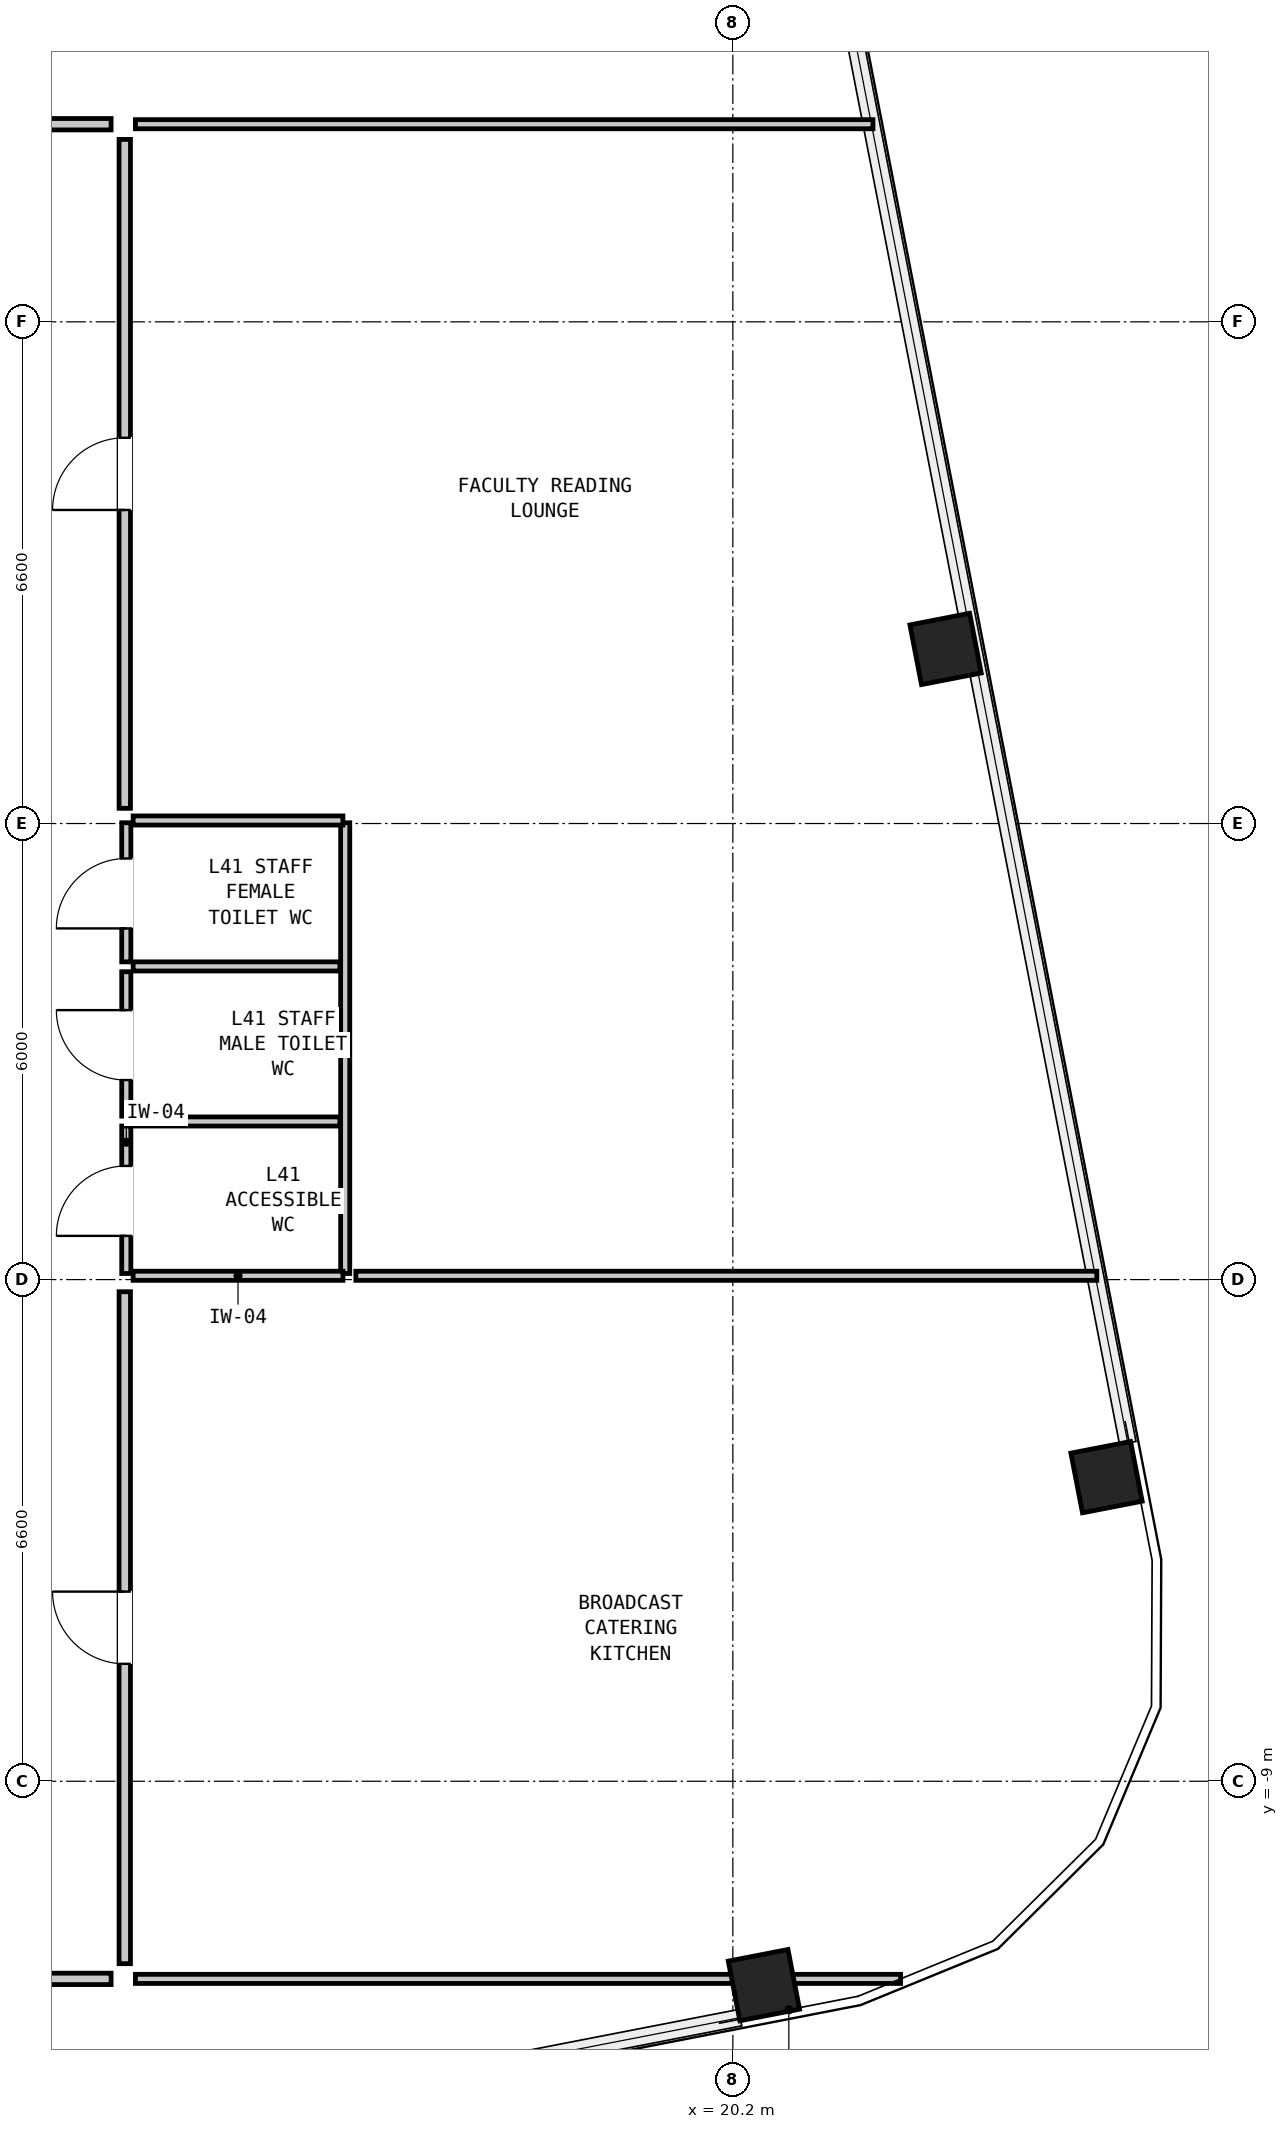
"""IFC4 building model, lengths in metres.
Left out: names, types, materials, properties, quantities, classifications, styles, units other than length and angle.
Written with IfcOpenShell. Run it as: python <this file> out.ifc"""

import sys

from ifc_helpers import new_model, si_unit, direction, frame, frame_2d, origin, origin_2d, place, context, subcontext, project, spatial, rectangle, hollow_rectangle, extrude, element, fill, save


model = new_model("IFC4")
c1 = context("Model", 3, precision=1e-05, world=origin(), true_north=direction((0.0, 1.0)))
c2 = subcontext(c1, "Body", "Model", "MODEL_VIEW")
j1 = project(units=[si_unit("LENGTHUNIT", "METRE"), si_unit("PLANEANGLEUNIT", "RADIAN")], contexts=[c1])
p1 = place(None, origin())
s1 = spatial("IfcSite", under=j1, at=p1, CompositionType="ELEMENT")
p2 = place(p1, origin())
s2 = spatial("IfcBuilding", under=s1, at=p2, CompositionType="ELEMENT")
p3 = place(p2, frame((0.0, 0.0, 140.25)))
s3 = spatial("IfcBuildingStorey", under=s2, at=p3, CompositionType="ELEMENT", Elevation=140.25)
for number, where, z_axis, x_axis in (
    (1, (20.609, -11.682, 0.0), (0.0, 0.0, 1.0), (0.982, 0.191, 0.0)),
    (2, (25.116, -5.0, 0.0), (0.0, 0.0, 1.0), (-0.191, 0.982, 0.0)),
    (3, (22.998, 5.896, 0.0), (0.0, 0.0, 1.0), (-0.191, 0.982, 0.0)),
):
    element("IfcColumn", number, at=place(p3, frame(where, z_axis=z_axis, x_axis=x_axis)), inside=s3, PredefinedType="COLUMN", context=c2, shape_type="SweptSolid", body=[
        extrude(hollow_rectangle(XDim=0.8, YDim=0.8, WallThickness=0.05, at=origin_2d()), origin(), (0.0, 0.0, 1.0), 4.35),
    ])
p4 = place(p3, frame((12.22, -2.32, 0.0), z_axis=(0.0, 0.0, 1.0), x_axis=(0.0, 1.0, 0.0)))
e4 = element("IfcWall", 4, at=p4, inside=s3, PredefinedType="PARTITIONING", context=c2, shape_type="SweptSolid", body=[
    extrude(rectangle(XDim=1.94, YDim=0.12, at=frame_2d((0.97, 0.0))), origin(), (0.0, 0.0, 1.0), 4.07),
])
p5 = place(p4, frame((0.495, 0.0, 0.0)))
e5 = element("IfcOpeningElement", 5, at=p5, cuts=e4, PredefinedType="OPENING", context=c2, shape_type="SweptSolid", body=[
    extrude(rectangle(XDim=0.92, YDim=2.1, at=frame_2d((0.46, 1.05))), frame((0.0, 0.072, 0.0), z_axis=(0.0, -1.0, 0.0), x_axis=(1.0, 0.0, 0.0)), (0.0, 0.0, 1.0), 0.144),
])
p6 = place(p3, frame((12.22, -0.25, 0.0), z_axis=(0.0, 0.0, 1.0), x_axis=(0.0, 1.0, 0.0)))
e6 = element("IfcWall", 6, at=p6, inside=s3, PredefinedType="PARTITIONING", context=c2, shape_type="SweptSolid", body=[
    extrude(rectangle(XDim=1.9, YDim=0.12, at=frame_2d((0.95, 0.0))), origin(), (0.0, 0.0, 1.0), 4.07),
])
p7 = place(p6, frame((0.475, 0.0, 0.0)))
e7 = element("IfcOpeningElement", 7, at=p7, cuts=e6, PredefinedType="OPENING", context=c2, shape_type="SweptSolid", body=[
    extrude(rectangle(XDim=0.92, YDim=2.1, at=frame_2d((0.46, 1.05))), frame((0.0, 0.072, 0.0), z_axis=(0.0, -1.0, 0.0), x_axis=(1.0, 0.0, 0.0)), (0.0, 0.0, 1.0), 0.144),
])
p8 = place(p3, frame((12.22, 1.78, 0.0), z_axis=(0.0, 0.0, 1.0), x_axis=(0.0, 1.0, 0.0)))
e8 = element("IfcWall", 8, at=p8, inside=s3, PredefinedType="PARTITIONING", context=c2, shape_type="SweptSolid", body=[
    extrude(rectangle(XDim=1.83, YDim=0.12, at=frame_2d((0.915, 0.0))), origin(), (0.0, 0.0, 1.0), 4.07),
])
p9 = place(p8, frame((0.44, 0.0, 0.0)))
e9 = element("IfcOpeningElement", 9, at=p9, cuts=e8, PredefinedType="OPENING", context=c2, shape_type="SweptSolid", body=[
    extrude(rectangle(XDim=0.92, YDim=2.1, at=frame_2d((0.46, 1.05))), frame((0.0, 0.072, 0.0), z_axis=(0.0, -1.0, 0.0), x_axis=(1.0, 0.0, 0.0)), (0.0, 0.0, 1.0), 0.144),
])
p10 = place(p3, frame((15.1, -2.32, 0.0), z_axis=(0.0, 0.0, 1.0), x_axis=(0.0, 1.0, 0.0)))
e10 = element("IfcWall", 10, at=p10, inside=s3, PredefinedType="PARTITIONING", context=c2, shape_type="SweptSolid", body=[
    extrude(rectangle(XDim=5.93, YDim=0.12, at=frame_2d((2.965, 0.0))), origin(), (0.0, 0.0, 1.0), 2.25),
])
for number, where, z_axis, x_axis in (
    (11, (12.31, -2.35, 0.0), (0.0, 0.0, 1.0), (1.0, 0.0, 0.0)),
    (12, (12.31, 3.64, 0.0), (0.0, 0.0, 1.0), (1.0, 0.0, 0.0)),
):
    element("IfcWall", number, at=place(p3, frame(where, z_axis=z_axis, x_axis=x_axis)), inside=s3, PredefinedType="PARTITIONING", context=c2, shape_type="SweptSolid", body=[
        extrude(rectangle(XDim=2.76, YDim=0.12, at=frame_2d((1.38, 0.0))), origin(), (0.0, 0.0, 1.0), 2.25),
    ])
p11 = place(p3, frame((12.31, -0.32, 0.0), z_axis=(0.0, 0.0, 1.0), x_axis=(1.0, 0.0, 0.0)))
e13 = element("IfcWall", 13, at=p11, inside=s3, PredefinedType="PARTITIONING", context=c2, shape_type="SweptSolid", body=[
    extrude(rectangle(XDim=2.72, YDim=0.12, at=frame_2d((1.36, 0.0))), origin(), (0.0, 0.0, 1.0), 4.07),
])
p12 = place(p3, frame((12.31, 1.72, 0.0), z_axis=(0.0, 0.0, 1.0), x_axis=(1.0, 0.0, 0.0)))
e14 = element("IfcWall", 14, at=p12, inside=s3, PredefinedType="PARTITIONING", context=c2, shape_type="SweptSolid", body=[
    extrude(rectangle(XDim=2.72, YDim=0.12, at=frame_2d((1.36, 0.0))), origin(), (0.0, 0.0, 1.0), 2.25),
])
p13 = place(p3, frame((12.34, 12.8, 0.0), z_axis=(0.0, 0.0, 1.0), x_axis=(1.0, 0.0, 0.0)))
e15 = element("IfcWall", 15, at=p13, inside=s3, PredefinedType="PARTITIONING", context=c2, shape_type="SweptSolid", body=[
    extrude(rectangle(XDim=9.703, YDim=0.12, at=frame_2d((4.852, 0.0))), origin(), (0.0, 0.0, 1.0), 4.07),
])
p14 = place(p3, frame((12.34, -11.6, 0.0), z_axis=(0.0, 0.0, 1.0), x_axis=(1.0, 0.0, 0.0)))
e16 = element("IfcWall", 16, at=p14, inside=s3, PredefinedType="PARTITIONING", context=c2, shape_type="SweptSolid", body=[
    extrude(rectangle(XDim=10.066, YDim=0.12, at=frame_2d((5.033, 0.0))), origin(), (0.0, 0.0, 1.0), 2.25),
])
p15 = place(p3, frame((15.24, -2.35, 0.0), z_axis=(0.0, 0.0, 1.0), x_axis=(1.0, 0.0, 0.0)))
e17 = element("IfcWall", 17, at=p15, inside=s3, PredefinedType="PARTITIONING", context=c2, shape_type="SweptSolid", body=[
    extrude(rectangle(XDim=9.748, YDim=0.12, at=frame_2d((4.874, 0.0))), origin(), (0.0, 0.0, 1.0), 2.25),
])
p16 = place(p3, frame((5.58, 12.8, 0.0), z_axis=(0.0, 0.0, 1.0), x_axis=(1.0, 0.0, 0.0)))
e18 = element("IfcWall", 18, at=p16, inside=s3, PredefinedType="PARTITIONING", context=c2, shape_type="SweptSolid", body=[
    extrude(rectangle(XDim=6.44, YDim=0.15, at=frame_2d((3.22, 0.0))), origin(), (0.0, 0.0, 1.0), 4.07),
])
p17 = place(p16, frame((2.62, 0.0, 0.0)))
e19 = element("IfcOpeningElement", 19, at=p17, cuts=e18, PredefinedType="OPENING", context=c2, shape_type="SweptSolid", body=[
    extrude(rectangle(XDim=1.2, YDim=2.1, at=frame_2d((0.6, 1.05))), frame((0.0, 0.087, 0.0), z_axis=(0.0, -1.0, 0.0), x_axis=(1.0, 0.0, 0.0)), (0.0, 0.0, 1.0), 0.174),
])
p18 = place(p3, frame((0.18, -11.6, 0.0), z_axis=(0.0, 0.0, 1.0), x_axis=(1.0, 0.0, 0.0)))
e20 = element("IfcWall", 20, at=p18, inside=s3, PredefinedType="PARTITIONING", context=c2, shape_type="SweptSolid", body=[
    extrude(rectangle(XDim=11.84, YDim=0.15, at=frame_2d((5.92, 0.0))), origin(), (0.0, 0.0, 1.0), 2.25),
])
p19 = place(p18, frame((5.32, 0.0, 0.0)))
e21 = element("IfcOpeningElement", 21, at=p19, cuts=e20, PredefinedType="OPENING", context=c2, shape_type="SweptSolid", body=[
    extrude(rectangle(XDim=1.2, YDim=2.1, at=frame_2d((0.6, 1.05))), frame((0.0, 0.087, 0.0), z_axis=(0.0, -1.0, 0.0), x_axis=(1.0, 0.0, 0.0)), (0.0, 0.0, 1.0), 0.174),
])
p20 = place(p3, frame((12.2, -11.4, 0.0), z_axis=(0.0, 0.0, 1.0), x_axis=(0.0, 1.0, 0.0)))
e22 = element("IfcWall", 22, at=p20, inside=s3, PredefinedType="PARTITIONING", context=c2, shape_type="SweptSolid", body=[
    extrude(rectangle(XDim=8.84, YDim=0.15, at=frame_2d((4.42, 0.0))), origin(), (0.0, 0.0, 1.0), 4.07),
])
p21 = place(p20, frame((3.945, 0.0, 0.0)))
e23 = element("IfcOpeningElement", 23, at=p21, cuts=e22, PredefinedType="OPENING", context=c2, shape_type="SweptSolid", body=[
    extrude(rectangle(XDim=0.95, YDim=2.1, at=frame_2d((0.475, 1.05))), frame((0.0, 0.087, 0.0), z_axis=(0.0, -1.0, 0.0), x_axis=(1.0, 0.0, 0.0)), (0.0, 0.0, 1.0), 0.174),
])
p22 = place(p3, frame((12.2, 3.8, 0.0), z_axis=(0.0, 0.0, 1.0), x_axis=(0.0, 1.0, 0.0)))
e24 = element("IfcWall", 24, at=p22, inside=s3, PredefinedType="PARTITIONING", context=c2, shape_type="SweptSolid", body=[
    extrude(rectangle(XDim=8.8, YDim=0.15, at=frame_2d((4.4, 0.0))), origin(), (0.0, 0.0, 1.0), 4.07),
])
p23 = place(p22, frame((3.925, 0.0, 0.0)))
e25 = element("IfcOpeningElement", 25, at=p23, cuts=e24, PredefinedType="OPENING", context=c2, shape_type="SweptSolid", body=[
    extrude(rectangle(XDim=0.95, YDim=2.1, at=frame_2d((0.475, 1.05))), frame((0.0, 0.087, 0.0), z_axis=(0.0, -1.0, 0.0), x_axis=(1.0, 0.0, 0.0)), (0.0, 0.0, 1.0), 0.174),
])
p24 = place(p5, origin())
e26 = element("IfcDoor", 26, at=p24, inside=s3, OperationType="SINGLE_SWING_LEFT", PredefinedType="DOOR", context=c2, shape_type="SweptSolid", body=[
    extrude(rectangle(XDim=0.92, YDim=2.1, at=frame_2d((0.46, 1.05))), frame((0.0, 0.025, 0.0), z_axis=(0.0, -1.0, 0.0), x_axis=(1.0, 0.0, 0.0)), (0.0, 0.0, 1.0), 0.05),
])
fill(e5, e26)
p25 = place(p7, origin())
e27 = element("IfcDoor", 27, at=p25, inside=s3, OperationType="SINGLE_SWING_RIGHT", PredefinedType="DOOR", context=c2, shape_type="SweptSolid", body=[
    extrude(rectangle(XDim=0.92, YDim=2.1, at=frame_2d((0.46, 1.05))), frame((0.0, 0.025, 0.0), z_axis=(0.0, -1.0, 0.0), x_axis=(1.0, 0.0, 0.0)), (0.0, 0.0, 1.0), 0.05),
])
fill(e7, e27)
p26 = place(p9, origin())
e28 = element("IfcDoor", 28, at=p26, inside=s3, OperationType="SINGLE_SWING_LEFT", PredefinedType="DOOR", context=c2, shape_type="SweptSolid", body=[
    extrude(rectangle(XDim=0.92, YDim=2.1, at=frame_2d((0.46, 1.05))), frame((0.0, 0.025, 0.0), z_axis=(0.0, -1.0, 0.0), x_axis=(1.0, 0.0, 0.0)), (0.0, 0.0, 1.0), 0.05),
])
fill(e9, e28)
p27 = place(p21, origin())
e29 = element("IfcDoor", 29, at=p27, inside=s3, OperationType="SINGLE_SWING_RIGHT", PredefinedType="DOOR", context=c2, shape_type="SweptSolid", body=[
    extrude(rectangle(XDim=0.95, YDim=2.1, at=frame_2d((0.475, 1.05))), frame((0.0, 0.025, 0.0), z_axis=(0.0, -1.0, 0.0), x_axis=(1.0, 0.0, 0.0)), (0.0, 0.0, 1.0), 0.05),
])
fill(e23, e29)
p28 = place(p23, origin())
e30 = element("IfcDoor", 30, at=p28, inside=s3, OperationType="SINGLE_SWING_LEFT", PredefinedType="DOOR", context=c2, shape_type="SweptSolid", body=[
    extrude(rectangle(XDim=0.95, YDim=2.1, at=frame_2d((0.475, 1.05))), frame((0.0, 0.025, 0.0), z_axis=(0.0, -1.0, 0.0), x_axis=(1.0, 0.0, 0.0)), (0.0, 0.0, 1.0), 0.05),
])
fill(e25, e30)
save(model, sys.argv[1])
